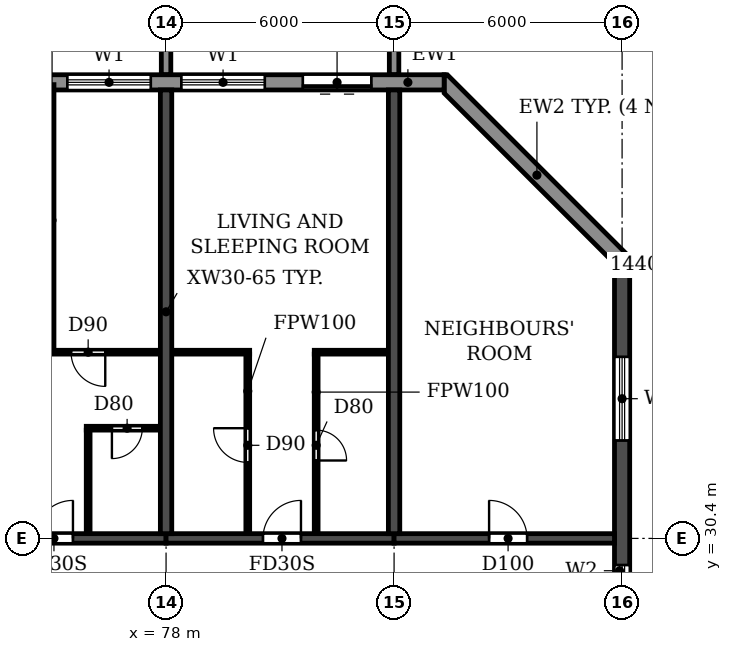
"""IFC4 building model, lengths in metres.
Left out: names, types, materials, properties, quantities, classifications, styles, units other than length and angle.
Written with IfcOpenShell. Run it as: python <this file> out.ifc"""

import sys

from ifc_helpers import new_model, si_unit, direction, frame, frame_2d, origin, place, context, subcontext, project, spatial, polyline, rectangle, outline, extrude, source, transform, mapped, element, fill, save


model = new_model("IFC4")
c1 = context("Model", 3, precision=1e-05, world=origin(), true_north=direction((0.0, 1.0)))
c2 = subcontext(c1, "Body", "Model", "MODEL_VIEW")
j1 = project(units=[si_unit("LENGTHUNIT", "METRE"), si_unit("PLANEANGLEUNIT", "RADIAN")], contexts=[c1])
p1 = place(None, origin())
s1 = spatial("IfcSite", under=j1, at=p1, CompositionType="ELEMENT")
p2 = place(p1, origin())
s2 = spatial("IfcBuilding", under=s1, at=p2, CompositionType="ELEMENT")
p3 = place(p2, frame((0.0, 0.0, 142.2)))
s3 = spatial("IfcBuildingStorey", under=s2, at=p3, CompositionType="ELEMENT", Elevation=142.2)
for number, where, z_axis, x_axis in (
    (1, (78.0, 30.525, 0.0), (0.0, 0.0, 1.0), (0.0, 1.0, 0.0)),
    (2, (84.0, 30.525, 0.0), (0.0, 0.0, 1.0), (0.0, 1.0, 0.0)),
):
    element("IfcWall", number, at=place(p3, frame(where, z_axis=z_axis, x_axis=x_axis)), inside=s3, PredefinedType="SHEAR", context=c2, shape_type="SweptSolid", body=[
        extrude(rectangle(XDim=11.675, YDim=0.3, at=frame_2d((5.837, 0.0))), origin(), (0.0, 0.0, 1.0), 3.07),
    ])
p4 = place(p3, frame((90.0, 4.683, 0.0), z_axis=(0.0, 0.0, 1.0), x_axis=(0.0, 1.0, 0.0)))
e3 = element("IfcWall", 3, at=p4, inside=s3, PredefinedType="SHEAR", context=c2, shape_type="SweptSolid", body=[
    extrude(rectangle(XDim=33.034, YDim=0.4, at=frame_2d((16.517, 0.0))), origin(), (0.0, 0.0, 1.0), 3.07),
])
p5 = place(p4, frame((23.817, 0.0, 0.9)))
e4 = element("IfcOpeningElement", 4, at=p5, cuts=e3, PredefinedType="OPENING", context=c2, shape_type="SweptSolid", body=[
    extrude(rectangle(XDim=1.2, YDim=1.5, at=frame_2d((0.6, 0.75))), frame((0.0, 0.21, 0.0), z_axis=(0.0, -1.0, 0.0), x_axis=(1.0, 0.0, 0.0)), (0.0, 0.0, 1.0), 0.42),
])
p6 = place(p4, frame((8.017, 0.0, 0.9)))
e5 = element("IfcOpeningElement", 5, at=p6, cuts=e3, PredefinedType="OPENING", context=c2, shape_type="SweptSolid", body=[
    extrude(rectangle(XDim=1.2, YDim=1.5, at=frame_2d((0.6, 0.75))), frame((0.0, 0.21, 0.0), z_axis=(0.0, -1.0, 0.0), x_axis=(1.0, 0.0, 0.0)), (0.0, 0.0, 1.0), 0.42),
])
p7 = place(p4, frame((28.293, 0.0, 0.6)))
e6 = element("IfcOpeningElement", 6, at=p7, cuts=e3, PredefinedType="OPENING", context=c2, shape_type="SweptSolid", body=[
    extrude(rectangle(XDim=2.2, YDim=1.8, at=frame_2d((1.1, 0.9))), frame((0.0, 0.21, 0.0), z_axis=(0.0, -1.0, 0.0), x_axis=(1.0, 0.0, 0.0)), (0.0, 0.0, 1.0), 0.42),
])
p8 = place(p4, frame((2.541, 0.0, 0.6)))
e7 = element("IfcOpeningElement", 7, at=p8, cuts=e3, PredefinedType="OPENING", context=c2, shape_type="SweptSolid", body=[
    extrude(rectangle(XDim=2.2, YDim=1.8, at=frame_2d((1.1, 0.9))), frame((0.0, 0.21, 0.0), z_axis=(0.0, -1.0, 0.0), x_axis=(1.0, 0.0, 0.0)), (0.0, 0.0, 1.0), 0.42),
])
p9 = place(p4, frame((12.817, 0.0, 0.6)))
e8 = element("IfcOpeningElement", 8, at=p9, cuts=e3, PredefinedType="OPENING", context=c2, shape_type="SweptSolid", body=[
    extrude(rectangle(XDim=2.2, YDim=1.8, at=frame_2d((1.1, 0.9))), frame((0.0, 0.21, 0.0), z_axis=(0.0, -1.0, 0.0), x_axis=(1.0, 0.0, 0.0)), (0.0, 0.0, 1.0), 0.42),
])
p10 = place(p3, frame((72.0, 30.4, 0.0), z_axis=(0.0, 0.0, 1.0), x_axis=(1.0, 0.0, 0.0)))
e9 = element("IfcWall", 9, at=p10, inside=s3, PredefinedType="SHEAR", context=c2, shape_type="SweptSolid", body=[
    extrude(rectangle(XDim=6.0, YDim=0.25, at=frame_2d((3.0, 0.0))), origin(), (0.0, 0.0, 1.0), 2.47),
])
p11 = place(p10, frame((2.55, 0.0, 0.0)))
e10 = element("IfcOpeningElement", 10, at=p11, cuts=e9, PredefinedType="OPENING", context=c2, shape_type="SweptSolid", body=[
    extrude(rectangle(XDim=1.0, YDim=2.1, at=frame_2d((0.5, 1.05))), frame((0.0, 0.135, 0.0), z_axis=(0.0, -1.0, 0.0), x_axis=(1.0, 0.0, 0.0)), (0.0, 0.0, 1.0), 0.27),
])
p12 = place(p3, frame((78.0, 30.4, 0.0), z_axis=(0.0, 0.0, 1.0), x_axis=(1.0, 0.0, 0.0)))
e11 = element("IfcWall", 11, at=p12, inside=s3, PredefinedType="SHEAR", context=c2, shape_type="SweptSolid", body=[
    extrude(rectangle(XDim=6.0, YDim=0.25, at=frame_2d((3.0, 0.0))), origin(), (0.0, 0.0, 1.0), 2.47),
])
p13 = place(p12, frame((2.55, 0.0, 0.0)))
e12 = element("IfcOpeningElement", 12, at=p13, cuts=e11, PredefinedType="OPENING", context=c2, shape_type="SweptSolid", body=[
    extrude(rectangle(XDim=1.0, YDim=2.1, at=frame_2d((0.5, 1.05))), frame((0.0, 0.135, 0.0), z_axis=(0.0, -1.0, 0.0), x_axis=(1.0, 0.0, 0.0)), (0.0, 0.0, 1.0), 0.27),
])
p14 = place(p3, frame((84.0, 30.4, 0.0), z_axis=(0.0, 0.0, 1.0), x_axis=(1.0, 0.0, 0.0)))
e13 = element("IfcWall", 13, at=p14, inside=s3, PredefinedType="SHEAR", context=c2, shape_type="SweptSolid", body=[
    extrude(rectangle(XDim=5.8, YDim=0.25, at=frame_2d((2.9, 0.0))), origin(), (0.0, 0.0, 1.0), 2.47),
])
p15 = place(p14, frame((2.5, 0.0, 0.0)))
e14 = element("IfcOpeningElement", 14, at=p15, cuts=e13, PredefinedType="OPENING", context=c2, shape_type="SweptSolid", body=[
    extrude(rectangle(XDim=1.0, YDim=2.1, at=frame_2d((0.5, 1.05))), frame((0.0, 0.135, 0.0), z_axis=(0.0, -1.0, 0.0), x_axis=(1.0, 0.0, 0.0)), (0.0, 0.0, 1.0), 0.27),
])
p16 = place(p3, origin())
e15 = element("IfcWall", 15, at=p16, inside=s3, PredefinedType="STANDARD", context=c2, shape_type="SweptSolid", body=[
    extrude(outline(polyline([(90.2, 37.717), (90.2, 37.8), (85.4, 42.6), (85.317, 42.6), (85.317, 42.117), (89.717, 37.717), (90.2, 37.717)])), origin(), (0.0, 0.0, 1.0), 3.07),
])
p17 = place(p3, frame((85.317, 42.4, 0.0), z_axis=(0.0, 0.0, 1.0), x_axis=(-1.0, 0.0, 0.0)))
e16 = element("IfcWall", 16, at=p17, inside=s3, PredefinedType="STANDARD", context=c2, shape_type="SweptSolid", body=[
    extrude(rectangle(XDim=68.634, YDim=0.4, at=frame_2d((34.317, 0.0))), origin(), (0.0, 0.0, 1.0), 3.07),
])
p18 = place(p17, frame((64.717, 0.0, 0.9)))
e17 = element("IfcOpeningElement", 17, at=p18, cuts=e16, PredefinedType="OPENING", context=c2, shape_type="SweptSolid", body=[
    extrude(rectangle(XDim=2.2, YDim=1.5, at=frame_2d((1.1, 0.75))), frame((0.0, 0.21, 0.0), z_axis=(0.0, -1.0, 0.0), x_axis=(1.0, 0.0, 0.0)), (0.0, 0.0, 1.0), 0.42),
])
p19 = place(p17, frame((61.917, 0.0, 0.0)))
e18 = element("IfcOpeningElement", 18, at=p19, cuts=e16, PredefinedType="OPENING", context=c2, shape_type="SweptSolid", body=[
    extrude(rectangle(XDim=1.8, YDim=2.4, at=frame_2d((0.9, 1.2))), frame((0.0, 0.21, 0.0), z_axis=(0.0, -1.0, 0.0), x_axis=(1.0, 0.0, 0.0)), (0.0, 0.0, 1.0), 0.42),
])
p20 = place(p17, frame((58.717, 0.0, 0.9)))
e19 = element("IfcOpeningElement", 19, at=p20, cuts=e16, PredefinedType="OPENING", context=c2, shape_type="SweptSolid", body=[
    extrude(rectangle(XDim=2.2, YDim=1.5, at=frame_2d((1.1, 0.75))), frame((0.0, 0.21, 0.0), z_axis=(0.0, -1.0, 0.0), x_axis=(1.0, 0.0, 0.0)), (0.0, 0.0, 1.0), 0.42),
])
p21 = place(p17, frame((55.917, 0.0, 0.0)))
e20 = element("IfcOpeningElement", 20, at=p21, cuts=e16, PredefinedType="OPENING", context=c2, shape_type="SweptSolid", body=[
    extrude(rectangle(XDim=1.8, YDim=2.4, at=frame_2d((0.9, 1.2))), frame((0.0, 0.21, 0.0), z_axis=(0.0, -1.0, 0.0), x_axis=(1.0, 0.0, 0.0)), (0.0, 0.0, 1.0), 0.42),
])
p22 = place(p17, frame((52.717, 0.0, 0.9)))
e21 = element("IfcOpeningElement", 21, at=p22, cuts=e16, PredefinedType="OPENING", context=c2, shape_type="SweptSolid", body=[
    extrude(rectangle(XDim=2.2, YDim=1.5, at=frame_2d((1.1, 0.75))), frame((0.0, 0.21, 0.0), z_axis=(0.0, -1.0, 0.0), x_axis=(1.0, 0.0, 0.0)), (0.0, 0.0, 1.0), 0.42),
])
p23 = place(p17, frame((49.717, 0.0, 0.9)))
e22 = element("IfcOpeningElement", 22, at=p23, cuts=e16, PredefinedType="OPENING", context=c2, shape_type="SweptSolid", body=[
    extrude(rectangle(XDim=2.2, YDim=1.5, at=frame_2d((1.1, 0.75))), frame((0.0, 0.21, 0.0), z_axis=(0.0, -1.0, 0.0), x_axis=(1.0, 0.0, 0.0)), (0.0, 0.0, 1.0), 0.42),
])
p24 = place(p17, frame((46.917, 0.0, 0.0)))
e23 = element("IfcOpeningElement", 23, at=p24, cuts=e16, PredefinedType="OPENING", context=c2, shape_type="SweptSolid", body=[
    extrude(rectangle(XDim=1.8, YDim=2.4, at=frame_2d((0.9, 1.2))), frame((0.0, 0.21, 0.0), z_axis=(0.0, -1.0, 0.0), x_axis=(1.0, 0.0, 0.0)), (0.0, 0.0, 1.0), 0.42),
])
p25 = place(p17, frame((43.717, 0.0, 0.9)))
e24 = element("IfcOpeningElement", 24, at=p25, cuts=e16, PredefinedType="OPENING", context=c2, shape_type="SweptSolid", body=[
    extrude(rectangle(XDim=2.2, YDim=1.5, at=frame_2d((1.1, 0.75))), frame((0.0, 0.21, 0.0), z_axis=(0.0, -1.0, 0.0), x_axis=(1.0, 0.0, 0.0)), (0.0, 0.0, 1.0), 0.42),
])
p26 = place(p17, frame((40.717, 0.0, 0.9)))
e25 = element("IfcOpeningElement", 25, at=p26, cuts=e16, PredefinedType="OPENING", context=c2, shape_type="SweptSolid", body=[
    extrude(rectangle(XDim=2.2, YDim=1.5, at=frame_2d((1.1, 0.75))), frame((0.0, 0.21, 0.0), z_axis=(0.0, -1.0, 0.0), x_axis=(1.0, 0.0, 0.0)), (0.0, 0.0, 1.0), 0.42),
])
p27 = place(p17, frame((37.717, 0.0, 0.9)))
e26 = element("IfcOpeningElement", 26, at=p27, cuts=e16, PredefinedType="OPENING", context=c2, shape_type="SweptSolid", body=[
    extrude(rectangle(XDim=2.2, YDim=1.5, at=frame_2d((1.1, 0.75))), frame((0.0, 0.21, 0.0), z_axis=(0.0, -1.0, 0.0), x_axis=(1.0, 0.0, 0.0)), (0.0, 0.0, 1.0), 0.42),
])
p28 = place(p17, frame((34.717, 0.0, 0.9)))
e27 = element("IfcOpeningElement", 27, at=p28, cuts=e16, PredefinedType="OPENING", context=c2, shape_type="SweptSolid", body=[
    extrude(rectangle(XDim=2.2, YDim=1.5, at=frame_2d((1.1, 0.75))), frame((0.0, 0.21, 0.0), z_axis=(0.0, -1.0, 0.0), x_axis=(1.0, 0.0, 0.0)), (0.0, 0.0, 1.0), 0.42),
])
p29 = place(p17, frame((31.917, 0.0, 0.0)))
e28 = element("IfcOpeningElement", 28, at=p29, cuts=e16, PredefinedType="OPENING", context=c2, shape_type="SweptSolid", body=[
    extrude(rectangle(XDim=1.8, YDim=2.4, at=frame_2d((0.9, 1.2))), frame((0.0, 0.21, 0.0), z_axis=(0.0, -1.0, 0.0), x_axis=(1.0, 0.0, 0.0)), (0.0, 0.0, 1.0), 0.42),
])
p30 = place(p17, frame((28.917, 0.0, 0.0)))
e29 = element("IfcOpeningElement", 29, at=p30, cuts=e16, PredefinedType="OPENING", context=c2, shape_type="SweptSolid", body=[
    extrude(rectangle(XDim=1.8, YDim=2.4, at=frame_2d((0.9, 1.2))), frame((0.0, 0.21, 0.0), z_axis=(0.0, -1.0, 0.0), x_axis=(1.0, 0.0, 0.0)), (0.0, 0.0, 1.0), 0.42),
])
p31 = place(p17, frame((25.717, 0.0, 0.9)))
e30 = element("IfcOpeningElement", 30, at=p31, cuts=e16, PredefinedType="OPENING", context=c2, shape_type="SweptSolid", body=[
    extrude(rectangle(XDim=2.2, YDim=1.5, at=frame_2d((1.1, 0.75))), frame((0.0, 0.21, 0.0), z_axis=(0.0, -1.0, 0.0), x_axis=(1.0, 0.0, 0.0)), (0.0, 0.0, 1.0), 0.42),
])
p32 = place(p17, frame((22.717, 0.0, 0.9)))
e31 = element("IfcOpeningElement", 31, at=p32, cuts=e16, PredefinedType="OPENING", context=c2, shape_type="SweptSolid", body=[
    extrude(rectangle(XDim=2.2, YDim=1.5, at=frame_2d((1.1, 0.75))), frame((0.0, 0.21, 0.0), z_axis=(0.0, -1.0, 0.0), x_axis=(1.0, 0.0, 0.0)), (0.0, 0.0, 1.0), 0.42),
])
p33 = place(p17, frame((19.717, 0.0, 0.9)))
e32 = element("IfcOpeningElement", 32, at=p33, cuts=e16, PredefinedType="OPENING", context=c2, shape_type="SweptSolid", body=[
    extrude(rectangle(XDim=2.2, YDim=1.5, at=frame_2d((1.1, 0.75))), frame((0.0, 0.21, 0.0), z_axis=(0.0, -1.0, 0.0), x_axis=(1.0, 0.0, 0.0)), (0.0, 0.0, 1.0), 0.42),
])
p34 = place(p17, frame((16.717, 0.0, 0.9)))
e33 = element("IfcOpeningElement", 33, at=p34, cuts=e16, PredefinedType="OPENING", context=c2, shape_type="SweptSolid", body=[
    extrude(rectangle(XDim=2.2, YDim=1.5, at=frame_2d((1.1, 0.75))), frame((0.0, 0.21, 0.0), z_axis=(0.0, -1.0, 0.0), x_axis=(1.0, 0.0, 0.0)), (0.0, 0.0, 1.0), 0.42),
])
p35 = place(p17, frame((13.917, 0.0, 0.0)))
e34 = element("IfcOpeningElement", 34, at=p35, cuts=e16, PredefinedType="OPENING", context=c2, shape_type="SweptSolid", body=[
    extrude(rectangle(XDim=1.8, YDim=2.4, at=frame_2d((0.9, 1.2))), frame((0.0, 0.21, 0.0), z_axis=(0.0, -1.0, 0.0), x_axis=(1.0, 0.0, 0.0)), (0.0, 0.0, 1.0), 0.42),
])
p36 = place(p17, frame((10.917, 0.0, 0.0)))
e35 = element("IfcOpeningElement", 35, at=p36, cuts=e16, PredefinedType="OPENING", context=c2, shape_type="SweptSolid", body=[
    extrude(rectangle(XDim=1.8, YDim=2.4, at=frame_2d((0.9, 1.2))), frame((0.0, 0.21, 0.0), z_axis=(0.0, -1.0, 0.0), x_axis=(1.0, 0.0, 0.0)), (0.0, 0.0, 1.0), 0.42),
])
p37 = place(p17, frame((7.717, 0.0, 0.9)))
e36 = element("IfcOpeningElement", 36, at=p37, cuts=e16, PredefinedType="OPENING", context=c2, shape_type="SweptSolid", body=[
    extrude(rectangle(XDim=2.2, YDim=1.5, at=frame_2d((1.1, 0.75))), frame((0.0, 0.21, 0.0), z_axis=(0.0, -1.0, 0.0), x_axis=(1.0, 0.0, 0.0)), (0.0, 0.0, 1.0), 0.42),
])
p38 = place(p17, frame((4.717, 0.0, 0.9)))
e37 = element("IfcOpeningElement", 37, at=p38, cuts=e16, PredefinedType="OPENING", context=c2, shape_type="SweptSolid", body=[
    extrude(rectangle(XDim=2.2, YDim=1.5, at=frame_2d((1.1, 0.75))), frame((0.0, 0.21, 0.0), z_axis=(0.0, -1.0, 0.0), x_axis=(1.0, 0.0, 0.0)), (0.0, 0.0, 1.0), 0.42),
])
p39 = place(p17, frame((1.917, 0.0, 0.0)))
e38 = element("IfcOpeningElement", 38, at=p39, cuts=e16, PredefinedType="OPENING", context=c2, shape_type="SweptSolid", body=[
    extrude(rectangle(XDim=1.8, YDim=2.4, at=frame_2d((0.9, 1.2))), frame((0.0, 0.21, 0.0), z_axis=(0.0, -1.0, 0.0), x_axis=(1.0, 0.0, 0.0)), (0.0, 0.0, 1.0), 0.42),
])
m1 = source(origin(), c2, "Body", "SweptSolid", [
    extrude(outline(polyline([(0.0, 0.0), (0.25, 0.0), (0.25, 3.1), (0.0, 3.1), (0.0, 0.0)])), origin(), (0.0, 0.0, 1.0), 3.1),
])
for number, where in (
    (39, (77.875, 42.6, 0.0)),
    (40, (83.875, 42.6, 0.0)),
):
    element("IfcWall", number, at=place(p3, frame(where)), inside=s3, PredefinedType="STANDARD", context=c2, shape_type="MappedRepresentation", body=[
        mapped(m1, transform((0.0, 0.0, 0.0))),
    ])
p40 = place(p3, frame((75.9, 33.3, 0.0), z_axis=(0.0, 0.0, 1.0), x_axis=(1.0, 0.0, 0.0)))
e41 = element("IfcWall", 41, at=p40, inside=s3, PredefinedType="PARTITIONING", context=c2, shape_type="SweptSolid", body=[
    extrude(rectangle(XDim=1.94, YDim=0.1, at=frame_2d((0.97, 0.0))), origin(), (0.0, 0.0, 1.0), 3.07),
])
p41 = place(p40, frame((0.675, 0.0, 0.0)))
e42 = element("IfcOpeningElement", 42, at=p41, cuts=e41, PredefinedType="OPENING", context=c2, shape_type="SweptSolid", body=[
    extrude(rectangle(XDim=0.8, YDim=2.1, at=frame_2d((0.4, 1.05))), frame((0.0, 0.06, 0.0), z_axis=(0.0, -1.0, 0.0), x_axis=(1.0, 0.0, 0.0)), (0.0, 0.0, 1.0), 0.12),
])
p42 = place(p3, frame((74.95, 35.3, 0.0), z_axis=(0.0, 0.0, 1.0), x_axis=(1.0, 0.0, 0.0)))
e43 = element("IfcWall", 43, at=p42, inside=s3, PredefinedType="PARTITIONING", context=c2, shape_type="SweptSolid", body=[
    extrude(rectangle(XDim=2.89, YDim=0.1, at=frame_2d((1.445, 0.0))), origin(), (0.0, 0.0, 1.0), 3.07),
])
p43 = place(p42, frame((0.55, 0.0, 0.0)))
e44 = element("IfcOpeningElement", 44, at=p43, cuts=e43, PredefinedType="OPENING", context=c2, shape_type="SweptSolid", body=[
    extrude(rectangle(XDim=0.9, YDim=2.1, at=frame_2d((0.45, 1.05))), frame((0.0, 0.06, 0.0), z_axis=(0.0, -1.0, 0.0), x_axis=(1.0, 0.0, 0.0)), (0.0, 0.0, 1.0), 0.12),
])
p44 = place(p3, frame((78.16, 35.3, 0.0), z_axis=(0.0, 0.0, 1.0), x_axis=(1.0, 0.0, 0.0)))
e45 = element("IfcWall", 45, at=p44, inside=s3, PredefinedType="PARTITIONING", context=c2, shape_type="SweptSolid", body=[
    extrude(rectangle(XDim=2.04, YDim=0.1, at=frame_2d((1.02, 0.0))), origin(), (0.0, 0.0, 1.0), 3.07),
])
p45 = place(p3, frame((81.9, 35.3, 0.0), z_axis=(0.0, 0.0, 1.0), x_axis=(1.0, 0.0, 0.0)))
e46 = element("IfcWall", 46, at=p45, inside=s3, PredefinedType="PARTITIONING", context=c2, shape_type="SweptSolid", body=[
    extrude(rectangle(XDim=1.94, YDim=0.1, at=frame_2d((0.97, 0.0))), origin(), (0.0, 0.0, 1.0), 3.07),
])
p46 = place(p3, frame((75.0, 35.35, 0.0), z_axis=(0.0, 0.0, 1.0), x_axis=(0.0, 1.0, 0.0)))
e47 = element("IfcWall", 47, at=p46, inside=s3, PredefinedType="PARTITIONING", context=c2, shape_type="SweptSolid", body=[
    extrude(rectangle(XDim=6.99, YDim=0.1, at=frame_2d((3.495, 0.0))), origin(), (0.0, 0.0, 1.0), 3.07),
])
p47 = place(p3, frame((75.95, 30.535, 0.0), z_axis=(0.0, 0.0, 1.0), x_axis=(0.0, 1.0, 0.0)))
e48 = element("IfcWall", 48, at=p47, inside=s3, PredefinedType="PARTITIONING", context=c2, shape_type="SweptSolid", body=[
    extrude(rectangle(XDim=2.715, YDim=0.1, at=frame_2d((1.357, 0.0))), origin(), (0.0, 0.0, 1.0), 3.07),
])
p48 = place(p3, frame((80.15, 30.535, 0.0), z_axis=(0.0, 0.0, 1.0), x_axis=(0.0, 1.0, 0.0)))
e49 = element("IfcWall", 49, at=p48, inside=s3, PredefinedType="PARTITIONING", context=c2, shape_type="SweptSolid", body=[
    extrude(rectangle(XDim=4.715, YDim=0.1, at=frame_2d((2.357, 0.0))), origin(), (0.0, 0.0, 1.0), 3.07),
])
p49 = place(p48, frame((1.865, 0.0, 0.0)))
e50 = element("IfcOpeningElement", 50, at=p49, cuts=e49, PredefinedType="OPENING", context=c2, shape_type="SweptSolid", body=[
    extrude(rectangle(XDim=0.9, YDim=2.1, at=frame_2d((0.45, 1.05))), frame((0.0, 0.06, 0.0), z_axis=(0.0, -1.0, 0.0), x_axis=(1.0, 0.0, 0.0)), (0.0, 0.0, 1.0), 0.12),
])
p50 = place(p3, frame((81.95, 30.535, 0.0), z_axis=(0.0, 0.0, 1.0), x_axis=(0.0, 1.0, 0.0)))
e51 = element("IfcWall", 51, at=p50, inside=s3, PredefinedType="PARTITIONING", context=c2, shape_type="SweptSolid", body=[
    extrude(rectangle(XDim=4.715, YDim=0.1, at=frame_2d((2.357, 0.0))), origin(), (0.0, 0.0, 1.0), 3.07),
])
p51 = place(p50, frame((1.915, 0.0, 0.0)))
e52 = element("IfcOpeningElement", 52, at=p51, cuts=e51, PredefinedType="OPENING", context=c2, shape_type="SweptSolid", body=[
    extrude(rectangle(XDim=0.8, YDim=2.1, at=frame_2d((0.4, 1.05))), frame((0.0, 0.06, 0.0), z_axis=(0.0, -1.0, 0.0), x_axis=(1.0, 0.0, 0.0)), (0.0, 0.0, 1.0), 0.12),
])
p52 = place(p5, origin())
e53 = element("IfcWindow", 53, at=p52, inside=s3, PartitioningType="SINGLE_PANEL", PredefinedType="WINDOW", context=c2, shape_type="SweptSolid", body=[
    extrude(rectangle(XDim=1.2, YDim=1.5, at=frame_2d((0.6, 0.75))), frame((0.0, 0.03, 0.0), z_axis=(0.0, -1.0, 0.0), x_axis=(1.0, 0.0, 0.0)), (0.0, 0.0, 1.0), 0.06),
])
fill(e4, e53)
p53 = place(p7, origin())
e54 = element("IfcWindow", 54, at=p53, inside=s3, PartitioningType="DOUBLE_PANEL_HORIZONTAL", PredefinedType="WINDOW", context=c2, shape_type="SweptSolid", body=[
    extrude(rectangle(XDim=2.2, YDim=1.8, at=frame_2d((1.1, 0.9))), frame((0.0, 0.03, 0.0), z_axis=(0.0, -1.0, 0.0), x_axis=(1.0, 0.0, 0.0)), (0.0, 0.0, 1.0), 0.06),
])
fill(e6, e54)
p54 = place(p37, origin())
e55 = element("IfcWindow", 55, at=p54, inside=s3, PartitioningType="DOUBLE_PANEL_HORIZONTAL", PredefinedType="WINDOW", context=c2, shape_type="SweptSolid", body=[
    extrude(rectangle(XDim=2.2, YDim=1.5, at=frame_2d((1.1, 0.75))), frame((0.0, 0.03, 0.0), z_axis=(0.0, -1.0, 0.0), x_axis=(1.0, 0.0, 0.0)), (0.0, 0.0, 1.0), 0.06),
])
fill(e36, e55)
p55 = place(p38, origin())
e56 = element("IfcWindow", 56, at=p55, inside=s3, PartitioningType="DOUBLE_PANEL_HORIZONTAL", PredefinedType="WINDOW", context=c2, shape_type="SweptSolid", body=[
    extrude(rectangle(XDim=2.2, YDim=1.5, at=frame_2d((1.1, 0.75))), frame((0.0, 0.03, 0.0), z_axis=(0.0, -1.0, 0.0), x_axis=(1.0, 0.0, 0.0)), (0.0, 0.0, 1.0), 0.06),
])
fill(e37, e56)
p56 = place(p39, origin())
e57 = element("IfcDoor", 57, at=p56, inside=s3, OperationType="DOUBLE_DOOR_SLIDING", PredefinedType="DOOR", context=c2, shape_type="SweptSolid", body=[
    extrude(rectangle(XDim=1.8, YDim=2.4, at=frame_2d((0.9, 1.2))), frame((0.0, 0.025, 0.0), z_axis=(0.0, -1.0, 0.0), x_axis=(1.0, 0.0, 0.0)), (0.0, 0.0, 1.0), 0.05),
])
fill(e38, e57)
p57 = place(p11, origin())
e58 = element("IfcDoor", 58, at=p57, inside=s3, OperationType="SINGLE_SWING_RIGHT", PredefinedType="DOOR", context=c2, shape_type="SweptSolid", body=[
    extrude(rectangle(XDim=1.0, YDim=2.1, at=frame_2d((0.5, 1.05))), frame((0.0, 0.025, 0.0), z_axis=(0.0, -1.0, 0.0), x_axis=(1.0, 0.0, 0.0)), (0.0, 0.0, 1.0), 0.05),
])
fill(e10, e58)
p58 = place(p43, frame((0.9, 0.0, 0.0), z_axis=(0.0, 0.0, 1.0), x_axis=(-1.0, 0.0, 0.0)))
e59 = element("IfcDoor", 59, at=p58, inside=s3, OperationType="SINGLE_SWING_LEFT", PredefinedType="DOOR", context=c2, shape_type="SweptSolid", body=[
    extrude(rectangle(XDim=0.9, YDim=2.1, at=frame_2d((0.45, 1.05))), frame((0.0, 0.025, 0.0), z_axis=(0.0, -1.0, 0.0), x_axis=(1.0, 0.0, 0.0)), (0.0, 0.0, 1.0), 0.05),
])
fill(e44, e59)
p59 = place(p41, frame((0.8, 0.0, 0.0), z_axis=(0.0, 0.0, 1.0), x_axis=(-1.0, 0.0, 0.0)))
e60 = element("IfcDoor", 60, at=p59, inside=s3, OperationType="SINGLE_SWING_RIGHT", PredefinedType="DOOR", context=c2, shape_type="SweptSolid", body=[
    extrude(rectangle(XDim=0.8, YDim=2.1, at=frame_2d((0.4, 1.05))), frame((0.0, 0.025, 0.0), z_axis=(0.0, -1.0, 0.0), x_axis=(1.0, 0.0, 0.0)), (0.0, 0.0, 1.0), 0.05),
])
fill(e42, e60)
p60 = place(p49, origin())
e61 = element("IfcDoor", 61, at=p60, inside=s3, OperationType="SINGLE_SWING_RIGHT", PredefinedType="DOOR", context=c2, shape_type="SweptSolid", body=[
    extrude(rectangle(XDim=0.9, YDim=2.1, at=frame_2d((0.45, 1.05))), frame((0.0, 0.025, 0.0), z_axis=(0.0, -1.0, 0.0), x_axis=(1.0, 0.0, 0.0)), (0.0, 0.0, 1.0), 0.05),
])
fill(e50, e61)
p61 = place(p13, origin())
e62 = element("IfcDoor", 62, at=p61, inside=s3, OperationType="SINGLE_SWING_RIGHT", PredefinedType="DOOR", context=c2, shape_type="SweptSolid", body=[
    extrude(rectangle(XDim=1.0, YDim=2.1, at=frame_2d((0.5, 1.05))), frame((0.0, 0.025, 0.0), z_axis=(0.0, -1.0, 0.0), x_axis=(1.0, 0.0, 0.0)), (0.0, 0.0, 1.0), 0.05),
])
fill(e12, e62)
p62 = place(p51, frame((0.8, 0.0, 0.0), z_axis=(0.0, 0.0, 1.0), x_axis=(-1.0, 0.0, 0.0)))
e63 = element("IfcDoor", 63, at=p62, inside=s3, OperationType="SINGLE_SWING_RIGHT", PredefinedType="DOOR", context=c2, shape_type="SweptSolid", body=[
    extrude(rectangle(XDim=0.8, YDim=2.1, at=frame_2d((0.4, 1.05))), frame((0.0, 0.025, 0.0), z_axis=(0.0, -1.0, 0.0), x_axis=(1.0, 0.0, 0.0)), (0.0, 0.0, 1.0), 0.05),
])
fill(e52, e63)
p63 = place(p15, origin())
e64 = element("IfcDoor", 64, at=p63, inside=s3, OperationType="SINGLE_SWING_LEFT", PredefinedType="DOOR", context=c2, shape_type="SweptSolid", body=[
    extrude(rectangle(XDim=1.0, YDim=2.1, at=frame_2d((0.5, 1.05))), frame((0.0, 0.025, 0.0), z_axis=(0.0, -1.0, 0.0), x_axis=(1.0, 0.0, 0.0)), (0.0, 0.0, 1.0), 0.05),
])
fill(e14, e64)
save(model, sys.argv[1])
